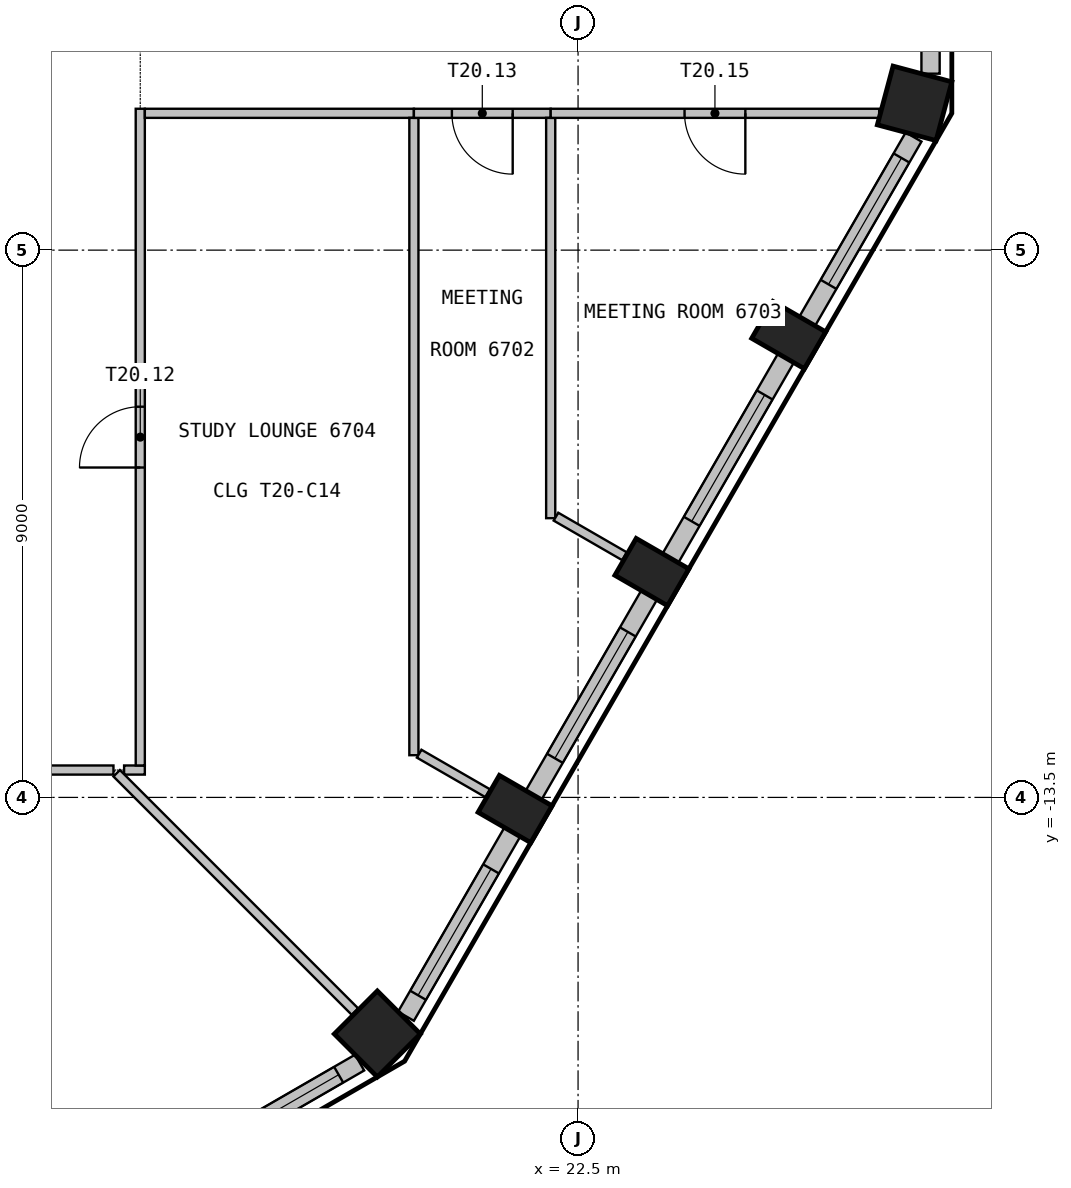
"""IFC4 building model, lengths in metres.
Left out: names, types, materials, properties, quantities, classifications, styles, units other than length and angle.
Written with IfcOpenShell. Run it as: python <this file> out.ifc"""

import sys

from ifc_helpers import new_model, si_unit, direction, frame, frame_2d, origin, origin_2d, place, context, subcontext, project, spatial, rectangle, extrude, element, fill, save


model = new_model("IFC4")
c1 = context("Model", 3, precision=1e-05, world=origin(), true_north=direction((0.0, 1.0)))
c2 = subcontext(c1, "Body", "Model", "MODEL_VIEW")
j1 = project(units=[si_unit("LENGTHUNIT", "METRE"), si_unit("PLANEANGLEUNIT", "RADIAN")], contexts=[c1])
p1 = place(None, origin())
s1 = spatial("IfcSite", under=j1, at=p1, CompositionType="ELEMENT")
p2 = place(p1, origin())
s2 = spatial("IfcBuilding", under=s1, at=p2, CompositionType="ELEMENT")
p3 = place(p2, frame((0.0, 0.0, 270.3)))
s3 = spatial("IfcBuildingStorey", under=s2, at=p3, CompositionType="ELEMENT", Elevation=270.3)
p4 = place(p3, frame((19.199, -17.39, 0.0), z_axis=(0.0, 0.0, 1.0), x_axis=(0.707106781187, 0.707106781187, 0.0)))
e1 = element("IfcColumn", 1, at=p4, inside=s3, PredefinedType="COLUMN", context=c2, shape_type="SweptSolid", body=[
    extrude(rectangle(XDim=1.0, YDim=1.0, at=origin_2d()), origin(), (0.0, 0.0, 1.0), 3.575),
])
for number, where, z_axis, x_axis in (
    (2, (21.464, -13.691, 0.0), (0.0, 0.0, 1.0), (0.5, 0.866, 0.0)),
    (3, (23.714, -9.794, 0.0), (0.0, 0.0, 1.0), (0.5, 0.866, 0.0)),
    (4, (25.964, -5.897, 0.0), (0.0, 0.0, 1.0), (0.5, 0.866, 0.0)),
):
    element("IfcColumn", number, at=place(p3, frame(where, z_axis=z_axis, x_axis=x_axis)), inside=s3, PredefinedType="COLUMN", context=c2, shape_type="SweptSolid", body=[
        extrude(rectangle(XDim=0.7, YDim=1.0, at=origin_2d()), origin(), (0.0, 0.0, 1.0), 3.575),
    ])
p5 = place(p3, frame((28.035, -2.086, 0.0), z_axis=(0.0, 0.0, 1.0), x_axis=(0.258819045103, 0.965925826289, 0.0)))
e5 = element("IfcColumn", 5, at=p5, inside=s3, PredefinedType="COLUMN", context=c2, shape_type="SweptSolid", body=[
    extrude(rectangle(XDim=1.0, YDim=1.0, at=origin_2d()), origin(), (0.0, 0.0, 1.0), 3.575),
])
p6 = place(p3, frame((16.14, -19.459, 0.0), z_axis=(0.0, 0.0, 1.0), x_axis=(0.866025316205, 0.500000151692, 0.0)))
e6 = element("IfcWall", 6, at=p6, inside=s3, PredefinedType="SOLIDWALL", context=c2, shape_type="SweptSolid", body=[
    extrude(rectangle(XDim=3.196, YDim=0.3, at=frame_2d((1.598, 0.0))), origin(), (0.0, 0.0, 1.0), 3.575),
])
p7 = place(p6, frame((0.398, 0.0, 0.9)))
e7 = element("IfcOpeningElement", 7, at=p7, cuts=e6, PredefinedType="OPENING", context=c2, shape_type="SweptSolid", body=[
    extrude(rectangle(XDim=2.4, YDim=2.1, at=frame_2d((1.2, 1.05))), frame((0.0, 0.16, 0.0), z_axis=(0.0, -1.0, 0.0), x_axis=(1.0, 0.0, 0.0)), (0.0, 0.0, 1.0), 0.32),
])
p8 = place(p3, frame((19.67, -17.099, 0.0), z_axis=(0.0, 0.0, 1.0), x_axis=(0.499960102815, 0.866048437209, 0.0)))
e8 = element("IfcWall", 8, at=p8, inside=s3, PredefinedType="SOLIDWALL", context=c2, shape_type="SweptSolid", body=[
    extrude(rectangle(XDim=3.498, YDim=0.3, at=frame_2d((1.749, 0.0))), origin(), (0.0, 0.0, 1.0), 3.575),
])
p9 = place(p8, frame((0.398, 0.0, 0.9)))
e9 = element("IfcOpeningElement", 9, at=p9, cuts=e8, PredefinedType="OPENING", context=c2, shape_type="SweptSolid", body=[
    extrude(rectangle(XDim=2.4, YDim=2.1, at=frame_2d((1.2, 1.05))), frame((0.0, 0.16, 0.0), z_axis=(0.0, -1.0, 0.0), x_axis=(1.0, 0.0, 0.0)), (0.0, 0.0, 1.0), 0.32),
])
p10 = place(p3, frame((21.769, -13.463, 0.0), z_axis=(0.0, 0.0, 1.0), x_axis=(0.499982058975, 0.866035761792, 0.0)))
e10 = element("IfcWall", 10, at=p10, inside=s3, PredefinedType="SOLIDWALL", context=c2, shape_type="SweptSolid", body=[
    extrude(rectangle(XDim=3.799, YDim=0.3, at=frame_2d((1.899, 0.0))), origin(), (0.0, 0.0, 1.0), 3.575),
])
p11 = place(p10, frame((0.699, 0.0, 0.9)))
e11 = element("IfcOpeningElement", 11, at=p11, cuts=e10, PredefinedType="OPENING", context=c2, shape_type="SweptSolid", body=[
    extrude(rectangle(XDim=2.4, YDim=2.1, at=frame_2d((1.2, 1.05))), frame((0.0, 0.16, 0.0), z_axis=(0.0, -1.0, 0.0), x_axis=(1.0, 0.0, 0.0)), (0.0, 0.0, 1.0), 0.32),
])
p12 = place(p3, frame((24.019, -9.566, 0.0), z_axis=(0.0, 0.0, 1.0), x_axis=(0.499982058975, 0.866035761792, 0.0)))
e12 = element("IfcWall", 12, at=p12, inside=s3, PredefinedType="SOLIDWALL", context=c2, shape_type="SweptSolid", body=[
    extrude(rectangle(XDim=3.799, YDim=0.3, at=frame_2d((1.899, 0.0))), origin(), (0.0, 0.0, 1.0), 3.575),
])
p13 = place(p12, frame((0.699, 0.0, 0.9)))
e13 = element("IfcOpeningElement", 13, at=p13, cuts=e12, PredefinedType="OPENING", context=c2, shape_type="SweptSolid", body=[
    extrude(rectangle(XDim=2.4, YDim=2.1, at=frame_2d((1.2, 1.05))), frame((0.0, 0.16, 0.0), z_axis=(0.0, -1.0, 0.0), x_axis=(1.0, 0.0, 0.0)), (0.0, 0.0, 1.0), 0.32),
])
p14 = place(p3, frame((26.269, -5.669, 0.0), z_axis=(0.0, 0.0, 1.0), x_axis=(0.499990325971, 0.866030989016, 0.0)))
e14 = element("IfcWall", 14, at=p14, inside=s3, PredefinedType="SOLIDWALL", context=c2, shape_type="SweptSolid", body=[
    extrude(rectangle(XDim=3.498, YDim=0.3, at=frame_2d((1.749, 0.0))), origin(), (0.0, 0.0, 1.0), 3.575),
])
p15 = place(p14, frame((0.699, 0.0, 0.9)))
e15 = element("IfcOpeningElement", 15, at=p15, cuts=e14, PredefinedType="OPENING", context=c2, shape_type="SweptSolid", body=[
    extrude(rectangle(XDim=2.4, YDim=2.1, at=frame_2d((1.2, 1.05))), frame((0.0, 0.16, 0.0), z_axis=(0.0, -1.0, 0.0), x_axis=(1.0, 0.0, 0.0)), (0.0, 0.0, 1.0), 0.32),
])
p16 = place(p3, frame((28.297, -1.598, 0.0), z_axis=(0.0, 0.0, 1.0), x_axis=(0.0, 1.0, 0.0)))
e16 = element("IfcWall", 16, at=p16, inside=s3, PredefinedType="SOLIDWALL", context=c2, shape_type="SweptSolid", body=[
    extrude(rectangle(XDim=3.196, YDim=0.3, at=frame_2d((1.598, 0.0))), origin(), (0.0, 0.0, 1.0), 3.575),
])
p17 = place(p16, frame((0.398, 0.0, 0.9)))
e17 = element("IfcOpeningElement", 17, at=p17, cuts=e16, PredefinedType="OPENING", context=c2, shape_type="SweptSolid", body=[
    extrude(rectangle(XDim=2.4, YDim=2.1, at=frame_2d((1.2, 1.05))), frame((0.0, 0.16, 0.0), z_axis=(0.0, -1.0, 0.0), x_axis=(1.0, 0.0, 0.0)), (0.0, 0.0, 1.0), 0.32),
])
p18 = place(p3, frame((2.25, -13.05, 0.0), z_axis=(0.0, 0.0, 1.0), x_axis=(1.0, 0.0, 0.0)))
e18 = element("IfcWall", 18, at=p18, inside=s3, PredefinedType="PARTITIONING", context=c2, shape_type="SweptSolid", body=[
    extrude(rectangle(XDim=12.609, YDim=0.15, at=frame_2d((6.304, 0.0))), origin(), (0.0, 0.0, 1.0), 3.575),
])
p19 = place(p18, frame((5.804, 0.0, 0.0)))
e19 = element("IfcOpeningElement", 19, at=p19, cuts=e18, PredefinedType="OPENING", context=c2, shape_type="SweptSolid", body=[
    extrude(rectangle(XDim=1.0, YDim=2.1, at=frame_2d((0.5, 1.05))), frame((0.0, 0.085, 0.0), z_axis=(0.0, -1.0, 0.0), x_axis=(1.0, 0.0, 0.0)), (0.0, 0.0, 1.0), 0.17),
])
p20 = place(p3, frame((15.034, -13.05, 0.0), z_axis=(0.0, 0.0, 1.0), x_axis=(1.0, 0.0, 0.0)))
e20 = element("IfcWall", 20, at=p20, inside=s3, PredefinedType="PARTITIONING", context=c2, shape_type="SweptSolid", body=[
    extrude(rectangle(XDim=0.341, YDim=0.15, at=frame_2d((0.17, 0.0))), origin(), (0.0, 0.0, 1.0), 3.575),
])
p21 = place(p3, frame((14.912, -13.103, 0.0), z_axis=(0.0, 0.0, 1.0), x_axis=(0.707018679171, -0.707194872226, 0.0)))
e21 = element("IfcWall", 21, at=p21, inside=s3, PredefinedType="PARTITIONING", context=c2, shape_type="SweptSolid", body=[
    extrude(rectangle(XDim=5.542, YDim=0.15, at=frame_2d((2.771, 0.0))), origin(), (0.0, 0.0, 1.0), 3.575),
])
p22 = place(p3, frame((15.3, -12.975, 0.0), z_axis=(0.0, 0.0, 1.0), x_axis=(0.0, 1.0, 0.0)))
e22 = element("IfcWall", 22, at=p22, inside=s3, PredefinedType="PARTITIONING", context=c2, shape_type="SweptSolid", body=[
    extrude(rectangle(XDim=10.8, YDim=0.15, at=frame_2d((5.4, 0.0))), origin(), (0.0, 0.0, 1.0), 3.575),
])
p23 = place(p22, frame((4.9, 0.0, 0.0)))
e23 = element("IfcOpeningElement", 23, at=p23, cuts=e22, PredefinedType="OPENING", context=c2, shape_type="SweptSolid", body=[
    extrude(rectangle(XDim=1.0, YDim=2.1, at=frame_2d((0.5, 1.05))), frame((0.0, 0.085, 0.0), z_axis=(0.0, -1.0, 0.0), x_axis=(1.0, 0.0, 0.0)), (0.0, 0.0, 1.0), 0.17),
])
p24 = place(p3, frame((19.8, -2.25, 0.0), z_axis=(0.0, 0.0, 1.0), x_axis=(-1.0, 0.0, 0.0)))
e24 = element("IfcWall", 24, at=p24, inside=s3, PredefinedType="PARTITIONING", context=c2, shape_type="SweptSolid", body=[
    extrude(rectangle(XDim=4.425, YDim=0.15, at=frame_2d((2.212, 0.0))), origin(), (0.0, 0.0, 1.0), 3.575),
])
p25 = place(p3, frame((19.8, -2.325, 0.0), z_axis=(0.0, 0.0, 1.0), x_axis=(0.0, -1.0, 0.0)))
e25 = element("IfcWall", 25, at=p25, inside=s3, PredefinedType="PARTITIONING", context=c2, shape_type="SweptSolid", body=[
    extrude(rectangle(XDim=10.481, YDim=0.15, at=frame_2d((5.24, 0.0))), origin(), (0.0, 0.0, 1.0), 3.575),
])
p26 = place(p3, frame((19.887, -12.781, 0.0), z_axis=(0.0, 0.0, 1.0), x_axis=(0.866110606688, -0.499852395195, 0.0)))
e26 = element("IfcWall", 26, at=p26, inside=s3, PredefinedType="PARTITIONING", context=c2, shape_type="SweptSolid", body=[
    extrude(rectangle(XDim=1.301, YDim=0.15, at=frame_2d((0.651, 0.0))), origin(), (0.0, 0.0, 1.0), 3.575),
])
p27 = place(p3, frame((22.05, -2.25, 0.0), z_axis=(0.0, 0.0, 1.0), x_axis=(-1.0, 0.0, 0.0)))
e27 = element("IfcWall", 27, at=p27, inside=s3, PredefinedType="PARTITIONING", context=c2, shape_type="SweptSolid", body=[
    extrude(rectangle(XDim=2.25, YDim=0.15, at=frame_2d((1.125, 0.0))), origin(), (0.0, 0.0, 1.0), 3.575),
])
p28 = place(p27, frame((0.625, 0.0, 0.0)))
e28 = element("IfcOpeningElement", 28, at=p28, cuts=e27, PredefinedType="OPENING", context=c2, shape_type="SweptSolid", body=[
    extrude(rectangle(XDim=1.0, YDim=2.1, at=frame_2d((0.5, 1.05))), frame((0.0, 0.085, 0.0), z_axis=(0.0, -1.0, 0.0), x_axis=(1.0, 0.0, 0.0)), (0.0, 0.0, 1.0), 0.17),
])
p29 = place(p3, frame((22.05, -2.325, 0.0), z_axis=(0.0, 0.0, 1.0), x_axis=(0.0, -1.0, 0.0)))
e29 = element("IfcWall", 29, at=p29, inside=s3, PredefinedType="PARTITIONING", context=c2, shape_type="SweptSolid", body=[
    extrude(rectangle(XDim=6.583, YDim=0.15, at=frame_2d((3.292, 0.0))), origin(), (0.0, 0.0, 1.0), 3.575),
])
p30 = place(p3, frame((22.136, -8.883, 0.0), z_axis=(0.0, 0.0, 1.0), x_axis=(0.865960725898, -0.500112008656, 0.0)))
e30 = element("IfcWall", 30, at=p30, inside=s3, PredefinedType="PARTITIONING", context=c2, shape_type="SweptSolid", body=[
    extrude(rectangle(XDim=1.302, YDim=0.15, at=frame_2d((0.651, 0.0))), origin(), (0.0, 0.0, 1.0), 3.575),
])
p31 = place(p3, frame((27.452, -2.25, 0.0), z_axis=(0.0, 0.0, 1.0), x_axis=(-1.0, 0.0, 0.0)))
e31 = element("IfcWall", 31, at=p31, inside=s3, PredefinedType="PARTITIONING", context=c2, shape_type="SweptSolid", body=[
    extrude(rectangle(XDim=5.402, YDim=0.15, at=frame_2d((2.701, 0.0))), origin(), (0.0, 0.0, 1.0), 3.575),
])
p32 = place(p31, frame((2.201, 0.0, 0.0)))
e32 = element("IfcOpeningElement", 32, at=p32, cuts=e31, PredefinedType="OPENING", context=c2, shape_type="SweptSolid", body=[
    extrude(rectangle(XDim=1.0, YDim=2.1, at=frame_2d((0.5, 1.05))), frame((0.0, 0.085, 0.0), z_axis=(0.0, -1.0, 0.0), x_axis=(1.0, 0.0, 0.0)), (0.0, 0.0, 1.0), 0.17),
])
p33 = place(p7, origin())
e33 = element("IfcWindow", 33, at=p33, inside=s3, PartitioningType="SINGLE_PANEL", PredefinedType="WINDOW", context=c2, shape_type="SweptSolid", body=[
    extrude(rectangle(XDim=2.4, YDim=2.1, at=frame_2d((1.2, 1.05))), frame((0.0, 0.03, 0.0), z_axis=(0.0, -1.0, 0.0), x_axis=(1.0, 0.0, 0.0)), (0.0, 0.0, 1.0), 0.06),
])
fill(e7, e33)
p34 = place(p9, origin())
e34 = element("IfcWindow", 34, at=p34, inside=s3, PartitioningType="SINGLE_PANEL", PredefinedType="WINDOW", context=c2, shape_type="SweptSolid", body=[
    extrude(rectangle(XDim=2.4, YDim=2.1, at=frame_2d((1.2, 1.05))), frame((0.0, 0.03, 0.0), z_axis=(0.0, -1.0, 0.0), x_axis=(1.0, 0.0, 0.0)), (0.0, 0.0, 1.0), 0.06),
])
fill(e9, e34)
p35 = place(p11, origin())
e35 = element("IfcWindow", 35, at=p35, inside=s3, PartitioningType="SINGLE_PANEL", PredefinedType="WINDOW", context=c2, shape_type="SweptSolid", body=[
    extrude(rectangle(XDim=2.4, YDim=2.1, at=frame_2d((1.2, 1.05))), frame((0.0, 0.03, 0.0), z_axis=(0.0, -1.0, 0.0), x_axis=(1.0, 0.0, 0.0)), (0.0, 0.0, 1.0), 0.06),
])
fill(e11, e35)
p36 = place(p13, origin())
e36 = element("IfcWindow", 36, at=p36, inside=s3, PartitioningType="SINGLE_PANEL", PredefinedType="WINDOW", context=c2, shape_type="SweptSolid", body=[
    extrude(rectangle(XDim=2.4, YDim=2.1, at=frame_2d((1.2, 1.05))), frame((0.0, 0.03, 0.0), z_axis=(0.0, -1.0, 0.0), x_axis=(1.0, 0.0, 0.0)), (0.0, 0.0, 1.0), 0.06),
])
fill(e13, e36)
p37 = place(p15, origin())
e37 = element("IfcWindow", 37, at=p37, inside=s3, PartitioningType="SINGLE_PANEL", PredefinedType="WINDOW", context=c2, shape_type="SweptSolid", body=[
    extrude(rectangle(XDim=2.4, YDim=2.1, at=frame_2d((1.2, 1.05))), frame((0.0, 0.03, 0.0), z_axis=(0.0, -1.0, 0.0), x_axis=(1.0, 0.0, 0.0)), (0.0, 0.0, 1.0), 0.06),
])
fill(e15, e37)
p38 = place(p23, origin())
e38 = element("IfcDoor", 38, at=p38, inside=s3, OperationType="SINGLE_SWING_LEFT", PredefinedType="DOOR", context=c2, shape_type="SweptSolid", body=[
    extrude(rectangle(XDim=1.0, YDim=2.1, at=frame_2d((0.5, 1.05))), frame((0.0, 0.025, 0.0), z_axis=(0.0, -1.0, 0.0), x_axis=(1.0, 0.0, 0.0)), (0.0, 0.0, 1.0), 0.05),
])
fill(e23, e38)
p39 = place(p28, origin())
e39 = element("IfcDoor", 39, at=p39, inside=s3, OperationType="SINGLE_SWING_RIGHT", PredefinedType="DOOR", context=c2, shape_type="SweptSolid", body=[
    extrude(rectangle(XDim=1.0, YDim=2.1, at=frame_2d((0.5, 1.05))), frame((0.0, 0.025, 0.0), z_axis=(0.0, -1.0, 0.0), x_axis=(1.0, 0.0, 0.0)), (0.0, 0.0, 1.0), 0.05),
])
fill(e28, e39)
p40 = place(p32, origin())
e40 = element("IfcDoor", 40, at=p40, inside=s3, OperationType="SINGLE_SWING_RIGHT", PredefinedType="DOOR", context=c2, shape_type="SweptSolid", body=[
    extrude(rectangle(XDim=1.0, YDim=2.1, at=frame_2d((0.5, 1.05))), frame((0.0, 0.025, 0.0), z_axis=(0.0, -1.0, 0.0), x_axis=(1.0, 0.0, 0.0)), (0.0, 0.0, 1.0), 0.05),
])
fill(e32, e40)
save(model, sys.argv[1])
